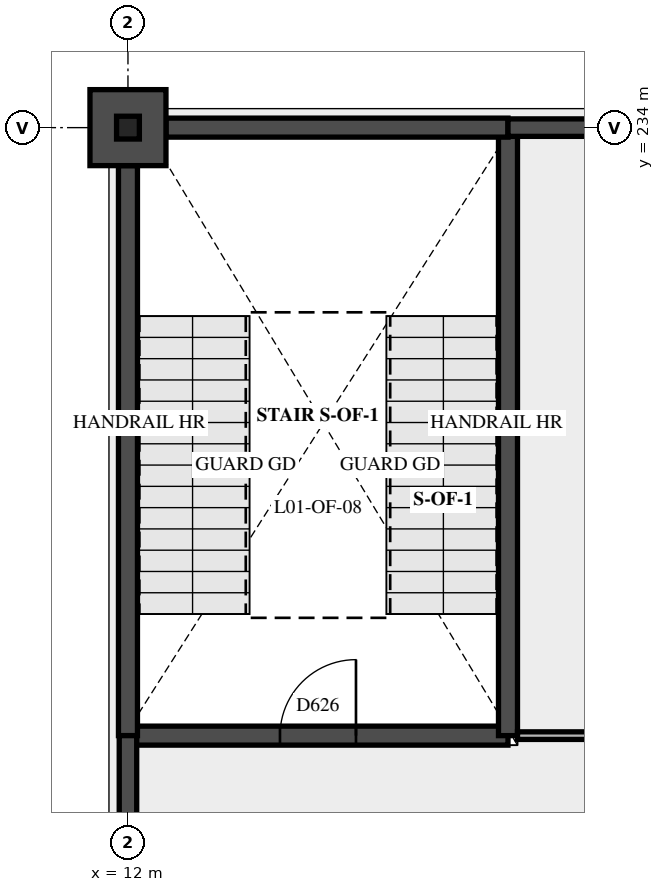
"""IFC4 building model, lengths in metres.
Left out: names, types, materials, properties, quantities, classifications, styles, units other than length and angle.
Written with IfcOpenShell. Run it as: python <this file> out.ifc"""

import sys

from ifc_helpers import new_model, si_unit, direction, frame, frame_2d, origin, origin_2d, place, context, subcontext, project, spatial, rectangle, i_section, extrude, element, fill, save


model = new_model("IFC4")
c1 = context("Model", 3, precision=1e-05, world=origin(), true_north=direction((0.0, 1.0)))
c2 = subcontext(c1, "Body", "Model", "MODEL_VIEW")
j1 = project(units=[si_unit("LENGTHUNIT", "METRE"), si_unit("PLANEANGLEUNIT", "RADIAN")], contexts=[c1])
p1 = place(None, origin())
s1 = spatial("IfcSite", under=j1, at=p1, CompositionType="ELEMENT")
p2 = place(p1, origin())
s2 = spatial("IfcBuilding", under=s1, at=p2, CompositionType="ELEMENT")
p3 = place(p2, frame((0.0, 0.0, 5.4)))
s3 = spatial("IfcBuildingStorey", under=s2, at=p3, CompositionType="ELEMENT", Elevation=5.4)
p4 = place(p3, frame((12.0, 234.0, 0.0), z_axis=(0.0, 0.0, 1.0), x_axis=(1.0, 0.0, 0.0)))
e1 = element("IfcColumn", 1, at=p4, inside=s3, PredefinedType="COLUMN", context=c2, shape_type="SweptSolid", body=[
    extrude(i_section(OverallWidth=0.3, OverallDepth=0.3, WebThickness=0.011, FlangeThickness=0.019, at=origin_2d()), origin(), (0.0, 0.0, 1.0), 5.4),
])
p5 = place(p3, frame((12.0, 226.0, 0.0), z_axis=(0.0, 0.0, 1.0), x_axis=(1.0, 0.0, 0.0)))
e2 = element("IfcWall", 2, at=p5, inside=s3, PredefinedType="SHEAR", context=c2, shape_type="SweptSolid", body=[
    extrude(rectangle(XDim=5.0, YDim=0.25, at=frame_2d((2.5, 0.0))), origin(), (0.0, 0.0, 1.0), 5.4),
])
p6 = place(p5, frame((2.0, 0.0, 0.0)))
e3 = element("IfcOpeningElement", 3, at=p6, cuts=e2, PredefinedType="OPENING", context=c2, shape_type="SweptSolid", body=[
    extrude(rectangle(XDim=1.0, YDim=2.1, at=frame_2d((0.5, 1.05))), frame((0.0, 0.135, 0.0), z_axis=(0.0, -1.0, 0.0), x_axis=(1.0, 0.0, 0.0)), (0.0, 0.0, 1.0), 0.27),
])
p7 = place(p3, frame((17.0, 226.0, 0.0), z_axis=(0.0, 0.0, 1.0), x_axis=(0.0, 1.0, 0.0)))
e4 = element("IfcWall", 4, at=p7, inside=s3, PredefinedType="SHEAR", context=c2, shape_type="SweptSolid", body=[
    extrude(rectangle(XDim=8.0, YDim=0.25, at=frame_2d((4.0, 0.0))), origin(), (0.0, 0.0, 1.0), 5.4),
])
p8 = place(p3, frame((12.5, 234.0, 0.0), z_axis=(0.0, 0.0, 1.0), x_axis=(1.0, 0.0, 0.0)))
e5 = element("IfcWall", 5, at=p8, inside=s3, PredefinedType="SHEAR", context=c2, shape_type="SweptSolid", body=[
    extrude(rectangle(XDim=4.5, YDim=0.25, at=frame_2d((2.25, 0.0))), origin(), (0.0, 0.0, 1.0), 5.4),
])
p9 = place(p3, frame((12.0, 226.0, 0.0), z_axis=(0.0, 0.0, 1.0), x_axis=(0.0, 1.0, 0.0)))
e6 = element("IfcWall", 6, at=p9, inside=s3, PredefinedType="SHEAR", context=c2, shape_type="SweptSolid", body=[
    extrude(rectangle(XDim=7.5, YDim=0.25, at=frame_2d((3.75, 0.0))), origin(), (0.0, 0.0, 1.0), 5.4),
])
p10 = place(p3, frame((17.0, 234.0, 0.0), z_axis=(0.0, 0.0, 1.0), x_axis=(1.0, 0.0, 0.0)))
e7 = element("IfcWall", 7, at=p10, inside=s3, PredefinedType="SOLIDWALL", context=c2, shape_type="SweptSolid", body=[
    extrude(rectangle(XDim=6.85, YDim=0.23, at=frame_2d((3.425, 0.0))), origin(), (0.0, 0.0, 1.0), 5.4),
])
p11 = place(p10, frame((1.9, 0.0, 0.9)))
e8 = element("IfcOpeningElement", 8, at=p11, cuts=e7, PredefinedType="OPENING", context=c2, shape_type="SweptSolid", body=[
    extrude(rectangle(XDim=1.2, YDim=3.3, at=frame_2d((0.6, 1.65))), frame((0.0, 0.125, 0.0), z_axis=(0.0, -1.0, 0.0), x_axis=(1.0, 0.0, 0.0)), (0.0, 0.0, 1.0), 0.25),
])
p12 = place(p10, frame((4.9, 0.0, 0.9)))
e9 = element("IfcOpeningElement", 9, at=p12, cuts=e7, PredefinedType="OPENING", context=c2, shape_type="SweptSolid", body=[
    extrude(rectangle(XDim=1.2, YDim=3.3, at=frame_2d((0.6, 1.65))), frame((0.0, 0.125, 0.0), z_axis=(0.0, -1.0, 0.0), x_axis=(1.0, 0.0, 0.0)), (0.0, 0.0, 1.0), 0.25),
])
p13 = place(p3, frame((12.0, 222.15, 0.0), z_axis=(0.0, 0.0, 1.0), x_axis=(0.0, 1.0, 0.0)))
e10 = element("IfcWall", 10, at=p13, inside=s3, PredefinedType="SOLIDWALL", context=c2, shape_type="SweptSolid", body=[
    extrude(rectangle(XDim=3.85, YDim=0.23, at=frame_2d((1.925, 0.0))), origin(), (0.0, 0.0, 1.0), 5.4),
])
p14 = place(p13, frame((0.75, 0.0, 0.9)))
e11 = element("IfcOpeningElement", 11, at=p14, cuts=e10, PredefinedType="OPENING", context=c2, shape_type="SweptSolid", body=[
    extrude(rectangle(XDim=1.2, YDim=3.3, at=frame_2d((0.6, 1.65))), frame((0.0, 0.125, 0.0), z_axis=(0.0, -1.0, 0.0), x_axis=(1.0, 0.0, 0.0)), (0.0, 0.0, 1.0), 0.25),
])
p15 = place(p3, frame((11.5, 234.0, 0.0), z_axis=(0.0, 0.0, 1.0), x_axis=(1.0, 0.0, 0.0)))
e12 = element("IfcWall", 12, at=p15, inside=s3, PredefinedType="SOLIDWALL", context=c2, shape_type="SweptSolid", body=[
    extrude(rectangle(XDim=1.0, YDim=1.0, at=frame_2d((0.5, 0.0))), origin(), (0.0, 0.0, 1.0), 5.4),
])
p16 = place(p3, frame((17.125, 226.0, 0.0), z_axis=(0.0, 0.0, 1.0), x_axis=(1.0, 0.0, 0.0)))
e13 = element("IfcWall", 13, at=p16, inside=s3, PredefinedType="PARTITIONING", context=c2, shape_type="SweptSolid", body=[
    extrude(rectangle(XDim=12.925, YDim=0.1, at=frame_2d((6.462, 0.0))), origin(), (0.0, 0.0, 1.0), 4.7),
])
p17 = place(p16, frame((5.925, 0.0, 0.0)))
e14 = element("IfcOpeningElement", 14, at=p17, cuts=e13, PredefinedType="OPENING", context=c2, shape_type="SweptSolid", body=[
    extrude(rectangle(XDim=0.9, YDim=2.1, at=frame_2d((0.45, 1.05))), frame((0.0, 0.06, 0.0), z_axis=(0.0, -1.0, 0.0), x_axis=(1.0, 0.0, 0.0)), (0.0, 0.0, 1.0), 0.12),
])
p18 = place(p6, origin())
e15 = element("IfcDoor", 15, at=p18, inside=s3, OperationType="SINGLE_SWING_RIGHT", PredefinedType="DOOR", context=c2, shape_type="SweptSolid", body=[
    extrude(rectangle(XDim=1.0, YDim=2.1, at=frame_2d((0.5, 1.05))), frame((0.0, 0.025, 0.0), z_axis=(0.0, -1.0, 0.0), x_axis=(1.0, 0.0, 0.0)), (0.0, 0.0, 1.0), 0.05),
])
fill(e3, e15)
save(model, sys.argv[1])
